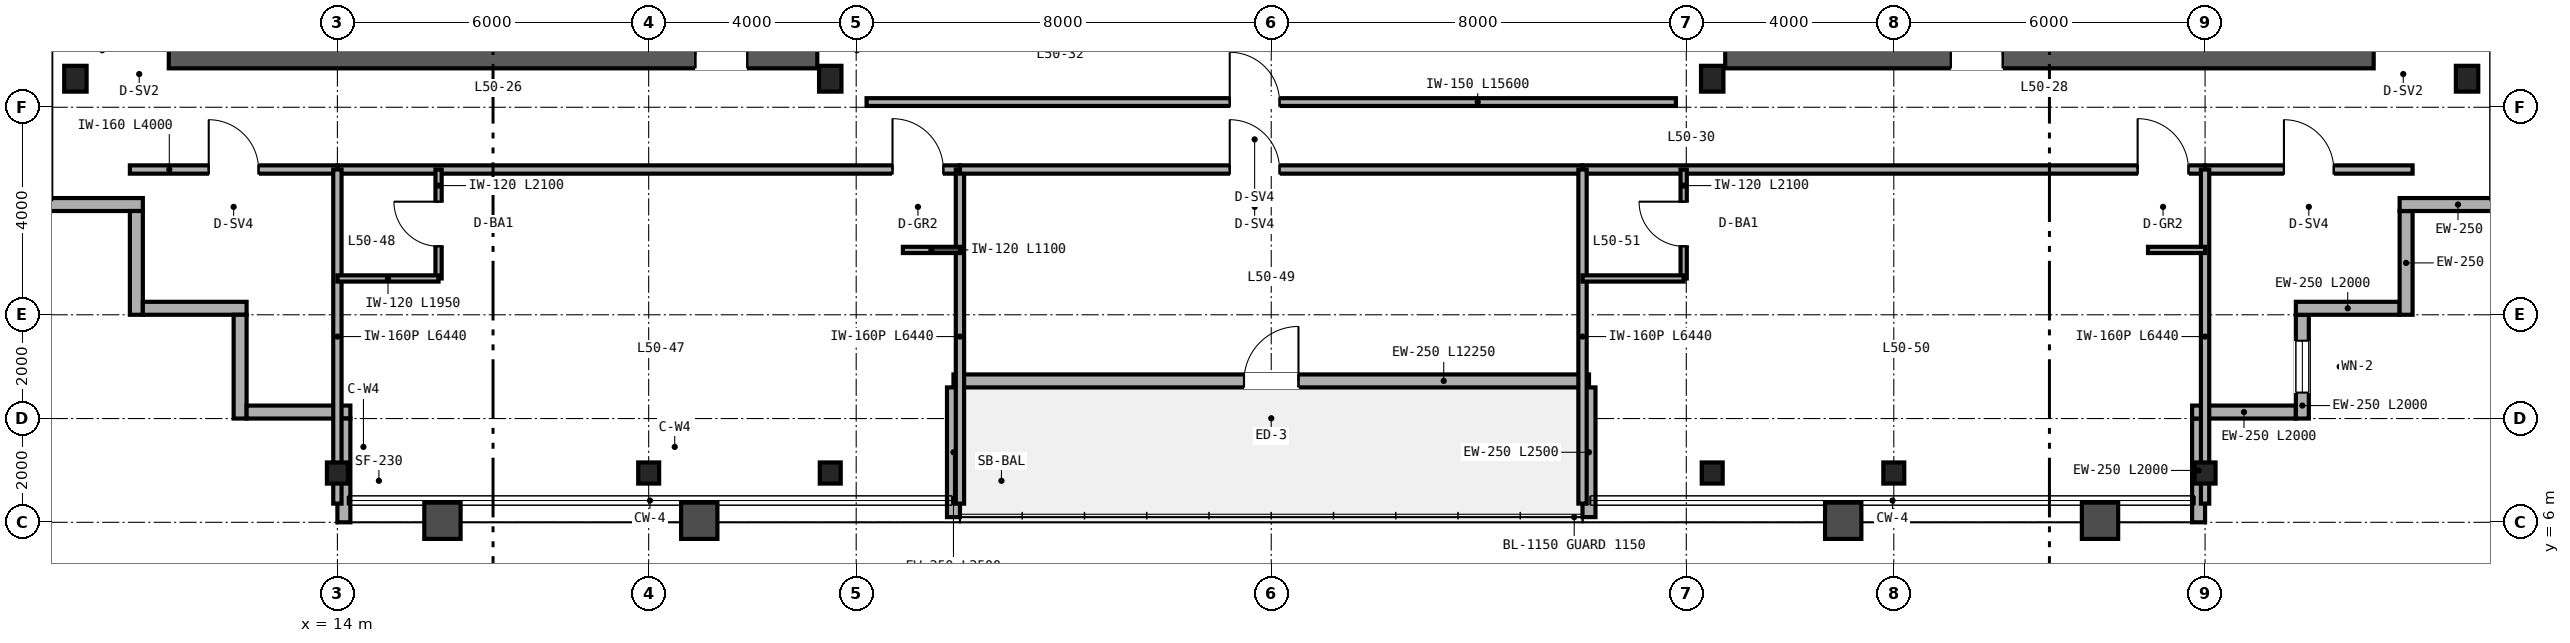
"""IFC4 building model, lengths in metres.
Left out: names, types, materials, properties, quantities, classifications, styles, units other than length and angle.
Written with IfcOpenShell. Run it as: python <this file> out.ifc"""

import sys

from ifc_helpers import new_model, si_unit, direction, frame, frame_2d, origin, origin_2d, place, context, subcontext, project, spatial, rectangle, i_section, extrude, source, transform, mapped, element, fill, save


model = new_model("IFC4")
c1 = context("Model", 3, precision=1e-05, world=origin(), true_north=direction((0.0, 1.0)))
c2 = subcontext(c1, "Body", "Model", "MODEL_VIEW")
j1 = project(units=[si_unit("LENGTHUNIT", "METRE"), si_unit("PLANEANGLEUNIT", "RADIAN")], contexts=[c1])
p1 = place(None, origin())
s1 = spatial("IfcSite", under=j1, at=p1, CompositionType="ELEMENT")
p2 = place(p1, origin())
s2 = spatial("IfcBuilding", under=s1, at=p2, CompositionType="ELEMENT")
p3 = place(p2, frame((0.0, 0.0, 199.2)))
s3 = spatial("IfcBuildingStorey", under=s2, at=p3, CompositionType="ELEMENT", Elevation=199.2)
p4 = place(p3, frame((10.75, 15.0, 0.0), z_axis=(0.0, 0.0, 1.0), x_axis=(1.0, 0.0, 0.0)))
e1 = element("IfcWall", 1, at=p4, inside=s3, PredefinedType="SHEAR", context=c2, shape_type="SweptSolid", body=[
    extrude(rectangle(XDim=12.5, YDim=0.5, at=frame_2d((6.25, 0.0))), origin(), (0.0, 0.0, 1.0), 3.37),
])
p5 = place(p4, frame((10.15, 0.0, 0.0)))
e2 = element("IfcOpeningElement", 2, at=p5, cuts=e1, PredefinedType="OPENING", context=c2, shape_type="SweptSolid", body=[
    extrude(rectangle(XDim=1.0, YDim=2.15, at=frame_2d((0.5, 1.075))), frame((0.0, 0.26, 0.0), z_axis=(0.0, -1.0, 0.0), x_axis=(1.0, 0.0, 0.0)), (0.0, 0.0, 1.0), 0.52),
])
p6 = place(p3, frame((40.75, 15.0, 0.0), z_axis=(0.0, 0.0, 1.0), x_axis=(1.0, 0.0, 0.0)))
e3 = element("IfcWall", 3, at=p6, inside=s3, PredefinedType="SHEAR", context=c2, shape_type="SweptSolid", body=[
    extrude(rectangle(XDim=12.5, YDim=0.5, at=frame_2d((6.25, 0.0))), origin(), (0.0, 0.0, 1.0), 3.37),
])
p7 = place(p6, frame((4.35, 0.0, 0.0)))
e4 = element("IfcOpeningElement", 4, at=p7, cuts=e3, PredefinedType="OPENING", context=c2, shape_type="SweptSolid", body=[
    extrude(rectangle(XDim=1.0, YDim=2.15, at=frame_2d((0.5, 1.075))), frame((0.0, 0.26, 0.0), z_axis=(0.0, -1.0, 0.0), x_axis=(1.0, 0.0, 0.0)), (0.0, 0.0, 1.0), 0.52),
])
m1 = source(origin(), c2, "Body", "SweptSolid", [
    extrude(i_section(OverallWidth=0.432, OverallDepth=0.498, WebThickness=0.056, FlangeThickness=0.089, FilletRadius=0.025, at=origin_2d()), origin(), (0.0, 0.0, 1.0), 3.37),
])
for number, where, z_axis, x_axis in (
    (5, (8.95, 14.55, 0.0), (0.0, 0.0, 1.0), (1.0, 0.0, 0.0)),
    (6, (23.5, 14.55, 0.0), (0.0, 0.0, 1.0), (1.0, 0.0, 0.0)),
    (7, (40.5, 14.55, 0.0), (0.0, 0.0, 1.0), (1.0, 0.0, 0.0)),
    (8, (55.05, 14.55, 0.0), (0.0, 0.0, 1.0), (1.0, 0.0, 0.0)),
):
    element("IfcColumn", number, at=place(p3, frame(where, z_axis=z_axis, x_axis=x_axis)), inside=s3, PredefinedType="COLUMN", context=c2, shape_type="MappedRepresentation", body=[
        mapped(m1, transform((0.0, 0.0, 0.0), scale=1.0)),
    ])
m2 = source(origin(), c2, "Body", "SweptSolid", [
    extrude(i_section(OverallWidth=0.404, OverallDepth=0.407, WebThickness=0.027, FlangeThickness=0.044, FilletRadius=0.025, at=origin_2d()), origin(), (0.0, 0.0, 1.0), 3.37),
])
for number, where, z_axis, x_axis in (
    (9, (14.0, 6.95, 0.0), (0.0, 0.0, 1.0), (1.0, 0.0, 0.0)),
    (10, (20.0, 6.95, 0.0), (0.0, 0.0, 1.0), (1.0, 0.0, 0.0)),
    (11, (23.5, 6.95, 0.0), (0.0, 0.0, 1.0), (1.0, 0.0, 0.0)),
    (12, (40.5, 6.95, 0.0), (0.0, 0.0, 1.0), (1.0, 0.0, 0.0)),
    (13, (44.0, 6.95, 0.0), (0.0, 0.0, 1.0), (1.0, 0.0, 0.0)),
    (14, (50.0, 6.95, 0.0), (0.0, 0.0, 1.0), (1.0, 0.0, 0.0)),
):
    element("IfcColumn", number, at=place(p3, frame(where, z_axis=z_axis, x_axis=x_axis)), inside=s3, PredefinedType="COLUMN", context=c2, shape_type="MappedRepresentation", body=[
        mapped(m2, transform((0.0, 0.0, 0.0), scale=1.0)),
    ])
p8 = place(p3, frame((49.875, 6.0, 0.0), z_axis=(0.0, 0.0, 1.0), x_axis=(0.0, 1.0, 0.0)))
e15 = element("IfcWall", 15, at=p8, inside=s3, PredefinedType="SOLIDWALL", context=c2, shape_type="SweptSolid", body=[
    extrude(rectangle(XDim=2.0, YDim=0.25, at=frame_2d((1.0, 0.0))), origin(), (0.0, 0.0, 1.0), 2.677),
])
p9 = place(p3, frame((49.75, 8.125, 0.0), z_axis=(0.0, 0.0, 1.0), x_axis=(1.0, 0.0, 0.0)))
e16 = element("IfcWall", 16, at=p9, inside=s3, PredefinedType="SOLIDWALL", context=c2, shape_type="SweptSolid", body=[
    extrude(rectangle(XDim=2.0, YDim=0.25, at=frame_2d((1.0, 0.0))), origin(), (0.0, 0.0, 1.0), 3.37),
])
p10 = place(p3, frame((51.875, 8.0, 0.0), z_axis=(0.0, 0.0, 1.0), x_axis=(0.0, 1.0, 0.0)))
e17 = element("IfcWall", 17, at=p10, inside=s3, PredefinedType="SOLIDWALL", context=c2, shape_type="SweptSolid", body=[
    extrude(rectangle(XDim=2.0, YDim=0.25, at=frame_2d((1.0, 0.0))), origin(), (0.0, 0.0, 1.0), 3.37),
])
p11 = place(p10, frame((0.5, 0.0, 0.85)))
e18 = element("IfcOpeningElement", 18, at=p11, cuts=e17, PredefinedType="OPENING", context=c2, shape_type="SweptSolid", body=[
    extrude(rectangle(XDim=1.0, YDim=1.9, at=frame_2d((0.5, 0.95))), frame((0.0, 0.135, 0.0), z_axis=(0.0, -1.0, 0.0), x_axis=(1.0, 0.0, 0.0)), (0.0, 0.0, 1.0), 0.27),
])
for number, where, z_axis, x_axis in (
    (19, (51.75, 10.125, 0.0), (0.0, 0.0, 1.0), (1.0, 0.0, 0.0)),
    (20, (53.875, 10.0, 0.0), (0.0, 0.0, 1.0), (0.0, 1.0, 0.0)),
):
    element("IfcWall", number, at=place(p3, frame(where, z_axis=z_axis, x_axis=x_axis)), inside=s3, PredefinedType="SOLIDWALL", context=c2, shape_type="SweptSolid", body=[
        extrude(rectangle(XDim=2.0, YDim=0.25, at=frame_2d((1.0, 0.0))), origin(), (0.0, 0.0, 1.0), 3.37),
    ])
for number, where, z_axis, x_axis in (
    (21, (53.75, 12.125, 0.0), (0.0, 0.0, 1.0), (1.0, 0.0, 0.0)),
    (22, (8.0, 12.125, 0.0), (0.0, 0.0, 1.0), (1.0, 0.0, 0.0)),
):
    element("IfcWall", number, at=place(p3, frame(where, z_axis=z_axis, x_axis=x_axis)), inside=s3, PredefinedType="SOLIDWALL", context=c2, shape_type="SweptSolid", body=[
        extrude(rectangle(XDim=2.25, YDim=0.25, at=frame_2d((1.125, 0.0))), origin(), (0.0, 0.0, 1.0), 3.37),
    ])
for number, where, z_axis, x_axis in (
    (23, (10.125, 12.0, 0.0), (0.0, 0.0, 1.0), (0.0, -1.0, 0.0)),
    (24, (10.25, 10.125, 0.0), (0.0, 0.0, 1.0), (1.0, 0.0, 0.0)),
    (25, (12.125, 10.0, 0.0), (0.0, 0.0, 1.0), (0.0, -1.0, 0.0)),
    (26, (12.25, 8.125, 0.0), (0.0, 0.0, 1.0), (1.0, 0.0, 0.0)),
):
    element("IfcWall", number, at=place(p3, frame(where, z_axis=z_axis, x_axis=x_axis)), inside=s3, PredefinedType="SOLIDWALL", context=c2, shape_type="SweptSolid", body=[
        extrude(rectangle(XDim=2.0, YDim=0.25, at=frame_2d((1.0, 0.0))), origin(), (0.0, 0.0, 1.0), 3.37),
    ])
p12 = place(p3, frame((14.125, 8.0, 0.0), z_axis=(0.0, 0.0, 1.0), x_axis=(0.0, -1.0, 0.0)))
e27 = element("IfcWall", 27, at=p12, inside=s3, PredefinedType="SOLIDWALL", context=c2, shape_type="SweptSolid", body=[
    extrude(rectangle(XDim=2.0, YDim=0.25, at=frame_2d((1.0, 0.0))), origin(), (0.0, 0.0, 1.0), 2.677),
])
p13 = place(p3, frame((25.875, 8.725, 0.0), z_axis=(0.0, 0.0, 1.0), x_axis=(1.0, 0.0, 0.0)))
e28 = element("IfcWall", 28, at=p13, inside=s3, PredefinedType="SOLIDWALL", context=c2, shape_type="SweptSolid", body=[
    extrude(rectangle(XDim=12.25, YDim=0.25, at=frame_2d((6.125, 0.0))), origin(), (0.0, 0.0, 1.0), 3.37),
])
p14 = place(p13, frame((5.6, 0.0, 0.0)))
e29 = element("IfcOpeningElement", 29, at=p14, cuts=e28, PredefinedType="OPENING", context=c2, shape_type="SweptSolid", body=[
    extrude(rectangle(XDim=1.05, YDim=2.15, at=frame_2d((0.525, 1.075))), frame((0.0, 0.135, 0.0), z_axis=(0.0, -1.0, 0.0), x_axis=(1.0, 0.0, 0.0)), (0.0, 0.0, 1.0), 0.27),
])
for number, where, z_axis, x_axis in (
    (30, (25.875, 6.1, 0.0), (0.0, 0.0, 1.0), (0.0, 1.0, 0.0)),
    (31, (38.125, 6.1, 0.0), (0.0, 0.0, 1.0), (0.0, 1.0, 0.0)),
):
    element("IfcWall", number, at=place(p3, frame(where, z_axis=z_axis, x_axis=x_axis)), inside=s3, PredefinedType="SOLIDWALL", context=c2, shape_type="SweptSolid", body=[
        extrude(rectangle(XDim=2.5, YDim=0.25, at=frame_2d((1.25, 0.0))), origin(), (0.0, 0.0, 1.0), 2.443),
    ])
p15 = place(p3, frame((24.2, 14.1, 0.0), z_axis=(0.0, 0.0, 1.0), x_axis=(1.0, 0.0, 0.0)))
e32 = element("IfcWall", 32, at=p15, inside=s3, PredefinedType="PARTITIONING", context=c2, shape_type="SweptSolid", body=[
    extrude(rectangle(XDim=15.6, YDim=0.15, at=frame_2d((7.8, 0.0))), origin(), (0.0, 0.0, 1.0), 3.37),
])
p16 = place(p15, frame((7.0, 0.0, 0.0)))
e33 = element("IfcOpeningElement", 33, at=p16, cuts=e32, PredefinedType="OPENING", context=c2, shape_type="SweptSolid", body=[
    extrude(rectangle(XDim=0.96, YDim=2.15, at=frame_2d((0.48, 1.075))), frame((0.0, 0.085, 0.0), z_axis=(0.0, -1.0, 0.0), x_axis=(1.0, 0.0, 0.0)), (0.0, 0.0, 1.0), 0.17),
])
p17 = place(p3, frame((10.0, 12.8, 0.0), z_axis=(0.0, 0.0, 1.0), x_axis=(1.0, 0.0, 0.0)))
e34 = element("IfcWall", 34, at=p17, inside=s3, PredefinedType="PARTITIONING", context=c2, shape_type="SweptSolid", body=[
    extrude(rectangle(XDim=4.0, YDim=0.16, at=frame_2d((2.0, 0.0))), origin(), (0.0, 0.0, 1.0), 3.37),
])
p18 = place(p17, frame((1.52, 0.0, 0.0)))
e35 = element("IfcOpeningElement", 35, at=p18, cuts=e34, PredefinedType="OPENING", context=c2, shape_type="SweptSolid", body=[
    extrude(rectangle(XDim=0.96, YDim=2.15, at=frame_2d((0.48, 1.075))), frame((0.0, 0.09, 0.0), z_axis=(0.0, -1.0, 0.0), x_axis=(1.0, 0.0, 0.0)), (0.0, 0.0, 1.0), 0.18),
])
p19 = place(p3, frame((50.0, 12.8, 0.0), z_axis=(0.0, 0.0, 1.0), x_axis=(1.0, 0.0, 0.0)))
e36 = element("IfcWall", 36, at=p19, inside=s3, PredefinedType="PARTITIONING", context=c2, shape_type="SweptSolid", body=[
    extrude(rectangle(XDim=4.0, YDim=0.16, at=frame_2d((2.0, 0.0))), origin(), (0.0, 0.0, 1.0), 3.37),
])
p20 = place(p19, frame((1.52, 0.0, 0.0)))
e37 = element("IfcOpeningElement", 37, at=p20, cuts=e36, PredefinedType="OPENING", context=c2, shape_type="SweptSolid", body=[
    extrude(rectangle(XDim=0.96, YDim=2.15, at=frame_2d((0.48, 1.075))), frame((0.0, 0.09, 0.0), z_axis=(0.0, -1.0, 0.0), x_axis=(1.0, 0.0, 0.0)), (0.0, 0.0, 1.0), 0.18),
])
p21 = place(p3, frame((14.0, 12.8, 0.0), z_axis=(0.0, 0.0, 1.0), x_axis=(1.0, 0.0, 0.0)))
e38 = element("IfcWall", 38, at=p21, inside=s3, PredefinedType="PARTITIONING", context=c2, shape_type="SweptSolid", body=[
    extrude(rectangle(XDim=12.0, YDim=0.16, at=frame_2d((6.0, 0.0))), origin(), (0.0, 0.0, 1.0), 2.913),
])
p22 = place(p21, frame((10.7, 0.0, 0.0)))
e39 = element("IfcOpeningElement", 39, at=p22, cuts=e38, PredefinedType="OPENING", context=c2, shape_type="SweptSolid", body=[
    extrude(rectangle(XDim=0.98, YDim=2.2, at=frame_2d((0.49, 1.1))), frame((0.0, 0.09, 0.0), z_axis=(0.0, -1.0, 0.0), x_axis=(1.0, 0.0, 0.0)), (0.0, 0.0, 1.0), 0.18),
])
p23 = place(p3, frame((14.0, 6.36, 0.0), z_axis=(0.0, 0.0, 1.0), x_axis=(0.0, 1.0, 0.0)))
e40 = element("IfcWall", 40, at=p23, inside=s3, PredefinedType="PARTITIONING", context=c2, shape_type="SweptSolid", body=[
    extrude(rectangle(XDim=6.44, YDim=0.16, at=frame_2d((3.22, 0.0))), origin(), (0.0, 0.0, 1.0), 2.677),
])
p24 = place(p3, frame((26.0, 6.36, 0.0), z_axis=(0.0, 0.0, 1.0), x_axis=(0.0, 1.0, 0.0)))
e41 = element("IfcWall", 41, at=p24, inside=s3, PredefinedType="PARTITIONING", context=c2, shape_type="SweptSolid", body=[
    extrude(rectangle(XDim=6.44, YDim=0.16, at=frame_2d((3.22, 0.0))), origin(), (0.0, 0.0, 1.0), 2.443),
])
p25 = place(p3, frame((15.95, 10.7, 0.0), z_axis=(0.0, 0.0, 1.0), x_axis=(0.0, 1.0, 0.0)))
e42 = element("IfcWall", 42, at=p25, inside=s3, PredefinedType="PARTITIONING", context=c2, shape_type="SweptSolid", body=[
    extrude(rectangle(XDim=2.1, YDim=0.12, at=frame_2d((1.05, 0.0))), origin(), (0.0, 0.0, 1.0), 3.37),
])
p26 = place(p25, frame((0.62, 0.0, 0.0)))
e43 = element("IfcOpeningElement", 43, at=p26, cuts=e42, PredefinedType="OPENING", context=c2, shape_type="SweptSolid", body=[
    extrude(rectangle(XDim=0.86, YDim=2.1, at=frame_2d((0.43, 1.05))), frame((0.0, 0.07, 0.0), z_axis=(0.0, -1.0, 0.0), x_axis=(1.0, 0.0, 0.0)), (0.0, 0.0, 1.0), 0.14),
])
p27 = place(p3, frame((14.0, 10.7, 0.0), z_axis=(0.0, 0.0, 1.0), x_axis=(1.0, 0.0, 0.0)))
e44 = element("IfcWall", 44, at=p27, inside=s3, PredefinedType="PARTITIONING", context=c2, shape_type="SweptSolid", body=[
    extrude(rectangle(XDim=1.95, YDim=0.12, at=frame_2d((0.975, 0.0))), origin(), (0.0, 0.0, 1.0), 3.37),
])
p28 = place(p3, frame((24.9, 11.25, 0.0), z_axis=(0.0, 0.0, 1.0), x_axis=(1.0, 0.0, 0.0)))
e45 = element("IfcWall", 45, at=p28, inside=s3, PredefinedType="PARTITIONING", context=c2, shape_type="SweptSolid", body=[
    extrude(rectangle(XDim=1.1, YDim=0.12, at=frame_2d((0.55, 0.0))), origin(), (0.0, 0.0, 1.0), 3.37),
])
p29 = place(p3, frame((26.0, 12.8, 0.0), z_axis=(0.0, 0.0, 1.0), x_axis=(1.0, 0.0, 0.0)))
e46 = element("IfcWall", 46, at=p29, inside=s3, PredefinedType="PARTITIONING", context=c2, shape_type="SweptSolid", body=[
    extrude(rectangle(XDim=12.0, YDim=0.16, at=frame_2d((6.0, 0.0))), origin(), (0.0, 0.0, 1.0), 3.37),
])
p30 = place(p29, frame((5.2, 0.0, 0.0)))
e47 = element("IfcOpeningElement", 47, at=p30, cuts=e46, PredefinedType="OPENING", context=c2, shape_type="SweptSolid", body=[
    extrude(rectangle(XDim=0.96, YDim=2.15, at=frame_2d((0.48, 1.075))), frame((0.0, 0.09, 0.0), z_axis=(0.0, -1.0, 0.0), x_axis=(1.0, 0.0, 0.0)), (0.0, 0.0, 1.0), 0.18),
])
p31 = place(p3, frame((38.0, 12.8, 0.0), z_axis=(0.0, 0.0, 1.0), x_axis=(1.0, 0.0, 0.0)))
e48 = element("IfcWall", 48, at=p31, inside=s3, PredefinedType="PARTITIONING", context=c2, shape_type="SweptSolid", body=[
    extrude(rectangle(XDim=12.0, YDim=0.16, at=frame_2d((6.0, 0.0))), origin(), (0.0, 0.0, 1.0), 2.913),
])
p32 = place(p31, frame((10.7, 0.0, 0.0)))
e49 = element("IfcOpeningElement", 49, at=p32, cuts=e48, PredefinedType="OPENING", context=c2, shape_type="SweptSolid", body=[
    extrude(rectangle(XDim=0.98, YDim=2.2, at=frame_2d((0.49, 1.1))), frame((0.0, 0.09, 0.0), z_axis=(0.0, -1.0, 0.0), x_axis=(1.0, 0.0, 0.0)), (0.0, 0.0, 1.0), 0.18),
])
p33 = place(p3, frame((38.0, 6.36, 0.0), z_axis=(0.0, 0.0, 1.0), x_axis=(0.0, 1.0, 0.0)))
e50 = element("IfcWall", 50, at=p33, inside=s3, PredefinedType="PARTITIONING", context=c2, shape_type="SweptSolid", body=[
    extrude(rectangle(XDim=6.44, YDim=0.16, at=frame_2d((3.22, 0.0))), origin(), (0.0, 0.0, 1.0), 2.443),
])
p34 = place(p3, frame((50.0, 6.36, 0.0), z_axis=(0.0, 0.0, 1.0), x_axis=(0.0, 1.0, 0.0)))
e51 = element("IfcWall", 51, at=p34, inside=s3, PredefinedType="PARTITIONING", context=c2, shape_type="SweptSolid", body=[
    extrude(rectangle(XDim=6.44, YDim=0.16, at=frame_2d((3.22, 0.0))), origin(), (0.0, 0.0, 1.0), 2.677),
])
p35 = place(p3, frame((39.95, 10.7, 0.0), z_axis=(0.0, 0.0, 1.0), x_axis=(0.0, 1.0, 0.0)))
e52 = element("IfcWall", 52, at=p35, inside=s3, PredefinedType="PARTITIONING", context=c2, shape_type="SweptSolid", body=[
    extrude(rectangle(XDim=2.1, YDim=0.12, at=frame_2d((1.05, 0.0))), origin(), (0.0, 0.0, 1.0), 3.37),
])
p36 = place(p35, frame((0.62, 0.0, 0.0)))
e53 = element("IfcOpeningElement", 53, at=p36, cuts=e52, PredefinedType="OPENING", context=c2, shape_type="SweptSolid", body=[
    extrude(rectangle(XDim=0.86, YDim=2.1, at=frame_2d((0.43, 1.05))), frame((0.0, 0.07, 0.0), z_axis=(0.0, -1.0, 0.0), x_axis=(1.0, 0.0, 0.0)), (0.0, 0.0, 1.0), 0.14),
])
p37 = place(p3, frame((38.0, 10.7, 0.0), z_axis=(0.0, 0.0, 1.0), x_axis=(1.0, 0.0, 0.0)))
e54 = element("IfcWall", 54, at=p37, inside=s3, PredefinedType="PARTITIONING", context=c2, shape_type="SweptSolid", body=[
    extrude(rectangle(XDim=1.95, YDim=0.12, at=frame_2d((0.975, 0.0))), origin(), (0.0, 0.0, 1.0), 3.37),
])
p38 = place(p3, frame((48.9, 11.25, 0.0), z_axis=(0.0, 0.0, 1.0), x_axis=(1.0, 0.0, 0.0)))
e55 = element("IfcWall", 55, at=p38, inside=s3, PredefinedType="PARTITIONING", context=c2, shape_type="SweptSolid", body=[
    extrude(rectangle(XDim=1.1, YDim=0.12, at=frame_2d((0.55, 0.0))), origin(), (0.0, 0.0, 1.0), 3.37),
])
m3 = source(origin(), c2, "Body", "SweptSolid", [
    extrude(rectangle(XDim=1.0, YDim=1.9, at=frame_2d((0.5, 0.95))), frame((0.0, 0.03, 0.0), z_axis=(0.0, -1.0, 0.0), x_axis=(1.0, 0.0, 0.0)), (0.0, 0.0, 1.0), 0.06),
])
p39 = place(p11, origin())
e56 = element("IfcWindow", 56, at=p39, inside=s3, PartitioningType="SINGLE_PANEL", PredefinedType="WINDOW", context=c2, shape_type="MappedRepresentation", body=[
    mapped(m3, transform((0.0, 0.0, 0.0), scale=1.0)),
])
fill(e18, e56)
m4 = source(origin(), c2, "Body", "SweptSolid", [
    extrude(rectangle(XDim=1.05, YDim=2.15, at=frame_2d((0.525, 1.075))), frame((0.0, 0.025, 0.0), z_axis=(0.0, -1.0, 0.0), x_axis=(1.0, 0.0, 0.0)), (0.0, 0.0, 1.0), 0.05),
])
p40 = place(p14, origin())
e57 = element("IfcDoor", 57, at=p40, inside=s3, OperationType="SINGLE_SWING_RIGHT", PredefinedType="DOOR", context=c2, shape_type="MappedRepresentation", body=[
    mapped(m4, transform((0.0, 0.0, 0.0), scale=1.0)),
])
fill(e29, e57)
m5 = source(origin(), c2, "Body", "SweptSolid", [
    extrude(rectangle(XDim=1.0, YDim=2.15, at=frame_2d((0.5, 1.075))), frame((0.0, 0.025, 0.0), z_axis=(0.0, -1.0, 0.0), x_axis=(1.0, 0.0, 0.0)), (0.0, 0.0, 1.0), 0.05),
])
p41 = place(p5, origin())
e58 = element("IfcDoor", 58, at=p41, inside=s3, OperationType="SINGLE_SWING_LEFT", PredefinedType="DOOR", context=c2, shape_type="MappedRepresentation", body=[
    mapped(m5, transform((0.0, 0.0, 0.0), scale=1.0)),
])
fill(e2, e58)
p42 = place(p7, origin())
e59 = element("IfcDoor", 59, at=p42, inside=s3, OperationType="SINGLE_SWING_RIGHT", PredefinedType="DOOR", context=c2, shape_type="MappedRepresentation", body=[
    mapped(m5, transform((0.0, 0.0, 0.0), scale=1.0)),
])
fill(e4, e59)
m6 = source(origin(), c2, "Body", "SweptSolid", [
    extrude(rectangle(XDim=0.96, YDim=2.15, at=frame_2d((0.48, 1.075))), frame((0.0, 0.025, 0.0), z_axis=(0.0, -1.0, 0.0), x_axis=(1.0, 0.0, 0.0)), (0.0, 0.0, 1.0), 0.05),
])
p43 = place(p16, origin())
e60 = element("IfcDoor", 60, at=p43, inside=s3, OperationType="SINGLE_SWING_LEFT", PredefinedType="DOOR", context=c2, shape_type="MappedRepresentation", body=[
    mapped(m6, transform((0.0, 0.0, 0.0), scale=1.0)),
])
fill(e33, e60)
p44 = place(p18, origin())
e61 = element("IfcDoor", 61, at=p44, inside=s3, OperationType="SINGLE_SWING_LEFT", PredefinedType="DOOR", context=c2, shape_type="MappedRepresentation", body=[
    mapped(m6, transform((0.0, 0.0, 0.0), scale=1.0)),
])
fill(e35, e61)
p45 = place(p20, origin())
e62 = element("IfcDoor", 62, at=p45, inside=s3, OperationType="SINGLE_SWING_LEFT", PredefinedType="DOOR", context=c2, shape_type="MappedRepresentation", body=[
    mapped(m6, transform((0.0, 0.0, 0.0), scale=1.0)),
])
fill(e37, e62)
m7 = source(origin(), c2, "Body", "SweptSolid", [
    extrude(rectangle(XDim=0.86, YDim=2.1, at=frame_2d((0.43, 1.05))), frame((0.0, 0.025, 0.0), z_axis=(0.0, -1.0, 0.0), x_axis=(1.0, 0.0, 0.0)), (0.0, 0.0, 1.0), 0.05),
])
p46 = place(p26, origin())
e63 = element("IfcDoor", 63, at=p46, inside=s3, OperationType="SINGLE_SWING_RIGHT", PredefinedType="DOOR", context=c2, shape_type="MappedRepresentation", body=[
    mapped(m7, transform((0.0, 0.0, 0.0), scale=1.0)),
])
fill(e43, e63)
m8 = source(origin(), c2, "Body", "SweptSolid", [
    extrude(rectangle(XDim=0.98, YDim=2.2, at=frame_2d((0.49, 1.1))), frame((0.0, 0.025, 0.0), z_axis=(0.0, -1.0, 0.0), x_axis=(1.0, 0.0, 0.0)), (0.0, 0.0, 1.0), 0.05),
])
p47 = place(p22, origin())
e64 = element("IfcDoor", 64, at=p47, inside=s3, OperationType="SINGLE_SWING_LEFT", PredefinedType="DOOR", context=c2, shape_type="MappedRepresentation", body=[
    mapped(m8, transform((0.0, 0.0, 0.0), scale=1.0)),
])
fill(e39, e64)
p48 = place(p30, origin())
e65 = element("IfcDoor", 65, at=p48, inside=s3, OperationType="SINGLE_SWING_LEFT", PredefinedType="DOOR", context=c2, shape_type="MappedRepresentation", body=[
    mapped(m6, transform((0.0, 0.0, 0.0), scale=1.0)),
])
fill(e47, e65)
p49 = place(p36, origin())
e66 = element("IfcDoor", 66, at=p49, inside=s3, OperationType="SINGLE_SWING_RIGHT", PredefinedType="DOOR", context=c2, shape_type="MappedRepresentation", body=[
    mapped(m7, transform((0.0, 0.0, 0.0), scale=1.0)),
])
fill(e53, e66)
p50 = place(p32, origin())
e67 = element("IfcDoor", 67, at=p50, inside=s3, OperationType="SINGLE_SWING_LEFT", PredefinedType="DOOR", context=c2, shape_type="MappedRepresentation", body=[
    mapped(m8, transform((0.0, 0.0, 0.0), scale=1.0)),
])
fill(e49, e67)
save(model, sys.argv[1])
